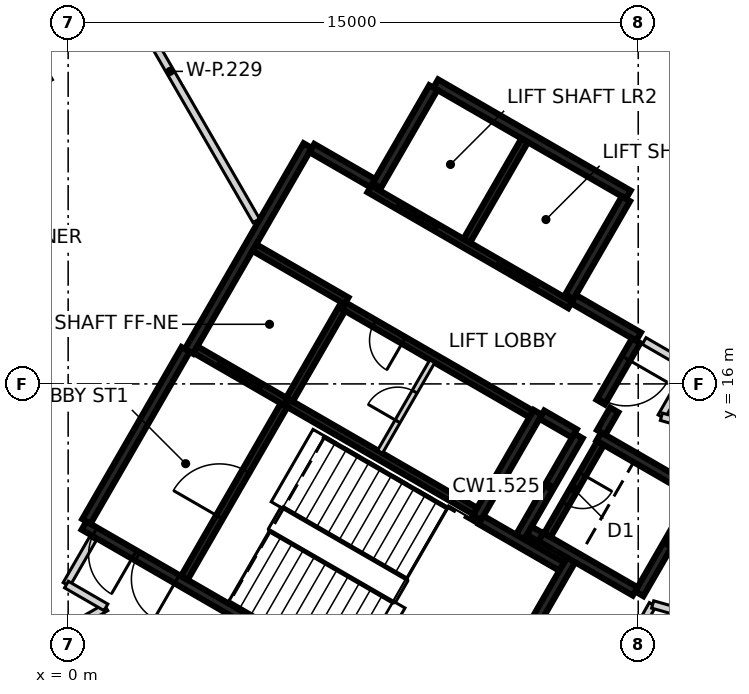
"""IFC4 building model, lengths in metres.
Left out: names, types, materials, properties, quantities, classifications, styles, units other than length and angle.
Written with IfcOpenShell. Run it as: python <this file> out.ifc"""

import sys

from ifc_helpers import new_model, si_unit, direction, frame, frame_2d, origin, place, context, subcontext, project, spatial, rectangle, extrude, element, fill, save


model = new_model("IFC4")
c1 = context("Model", 3, precision=1e-05, world=origin(), true_north=direction((0.0, 1.0)))
c2 = subcontext(c1, "Body", "Model", "MODEL_VIEW")
j1 = project(units=[si_unit("LENGTHUNIT", "METRE"), si_unit("PLANEANGLEUNIT", "RADIAN")], contexts=[c1])
p1 = place(None, origin())
s1 = spatial("IfcSite", under=j1, at=p1, CompositionType="ELEMENT")
p2 = place(p1, origin())
s2 = spatial("IfcBuilding", under=s1, at=p2, CompositionType="ELEMENT")
p3 = place(p2, frame((0.0, 0.0, 63.8)))
s3 = spatial("IfcBuildingStorey", under=s2, at=p3, CompositionType="ELEMENT", Elevation=63.8)
p4 = place(p3, frame((10.42, 6.498, 0.0), z_axis=(0.0, 0.0, 1.0), x_axis=(-0.866021906294, 0.500006057782, 0.0)))
e1 = element("IfcWall", 1, at=p4, inside=s3, PredefinedType="SHEAR", context=c2, shape_type="SweptSolid", body=[
    extrude(rectangle(XDim=11.55, YDim=0.25, at=frame_2d((5.775, 0.0))), origin(), (0.0, 0.0, 1.0), 3.125),
])
p5 = place(p4, frame((10.025, 0.0, 0.0)))
e2 = element("IfcOpeningElement", 2, at=p5, cuts=e1, PredefinedType="OPENING", context=c2, shape_type="SweptSolid", body=[
    extrude(rectangle(XDim=1.2, YDim=2.1, at=frame_2d((0.6, 1.05))), frame((0.0, 0.135, 0.0), z_axis=(0.0, -1.0, 0.0), x_axis=(1.0, 0.0, 0.0)), (0.0, 0.0, 1.0), 0.27),
])
p6 = place(p4, frame((8.725, 0.0, 0.0)))
e3 = element("IfcOpeningElement", 3, at=p6, cuts=e1, PredefinedType="OPENING", context=c2, shape_type="SweptSolid", body=[
    extrude(rectangle(XDim=1.2, YDim=2.1, at=frame_2d((0.6, 1.05))), frame((0.0, 0.135, 0.0), z_axis=(0.0, -1.0, 0.0), x_axis=(1.0, 0.0, 0.0)), (0.0, 0.0, 1.0), 0.27),
])
p7 = place(p3, frame((3.179, 16.856, 0.0), z_axis=(0.0, 0.0, 1.0), x_axis=(0.500004234368, 0.866022959057, 0.0)))
e4 = element("IfcWall", 4, at=p7, inside=s3, PredefinedType="SHEAR", context=c2, shape_type="SweptSolid", body=[
    extrude(rectangle(XDim=6.25, YDim=0.25, at=frame_2d((3.125, 0.0))), origin(), (0.0, 0.0, 1.0), 3.125),
])
p8 = place(p3, frame((9.673, 23.903, 0.0), z_axis=(0.0, 0.0, 1.0), x_axis=(0.86603616409, -0.499981362141, 0.0)))
e5 = element("IfcWall", 5, at=p8, inside=s3, PredefinedType="SHEAR", context=c2, shape_type="SweptSolid", body=[
    extrude(rectangle(XDim=5.85, YDim=0.25, at=frame_2d((2.925, 0.0))), origin(), (0.0, 0.0, 1.0), 3.125),
])
p9 = place(p3, frame((0.48, 12.381, 0.0), z_axis=(0.0, 0.0, 1.0), x_axis=(0.49999885962, 0.866026062182, 0.0)))
e6 = element("IfcWall", 6, at=p9, inside=s3, PredefinedType="SHEAR", context=c2, shape_type="SweptSolid", body=[
    extrude(rectangle(XDim=5.225, YDim=0.25, at=frame_2d((2.612, 0.0))), origin(), (0.0, 0.0, 1.0), 3.125),
])
p10 = place(p3, frame((13.238, 11.378, 0.0), z_axis=(0.0, 0.0, 1.0), x_axis=(-0.500008851346, -0.866020293397, 0.0)))
e7 = element("IfcWall", 7, at=p10, inside=s3, PredefinedType="SHEAR", context=c2, shape_type="SweptSolid", body=[
    extrude(rectangle(XDim=5.51, YDim=0.25, at=frame_2d((2.755, 0.0))), origin(), (0.0, 0.0, 1.0), 3.125),
])
p11 = place(p3, frame((12.357, 15.252, 0.0), z_axis=(0.0, 0.0, 1.0), x_axis=(-0.500028443584, -0.866008981251, 0.0)))
e8 = element("IfcWall", 8, at=p11, inside=s3, PredefinedType="SHEAR", context=c2, shape_type="SweptSolid", body=[
    extrude(rectangle(XDim=3.2, YDim=0.25, at=frame_2d((1.6, 0.0))), origin(), (0.0, 0.0, 1.0), 3.125),
])
for number, where, z_axis, x_axis in (
    (9, (8.123, 21.219, 0.0), (0.0, 0.0, 1.0), (0.5, 0.866, 0.0)),
    (10, (14.676, 20.87, 0.0), (0.0, 0.0, 1.0), (-0.5, -0.866, 0.0)),
):
    element("IfcWall", number, at=place(p3, frame(where, z_axis=z_axis, x_axis=x_axis)), inside=s3, PredefinedType="SHEAR", context=c2, shape_type="SweptSolid", body=[
        extrude(rectangle(XDim=2.975, YDim=0.25, at=frame_2d((1.487, 0.0))), origin(), (0.0, 0.0, 1.0), 3.125),
    ])
p12 = place(p3, frame((16.552, 13.119, 0.0), z_axis=(0.0, 0.0, 1.0), x_axis=(-0.499978833458, -0.866037623948, 0.0)))
e11 = element("IfcWall", 11, at=p12, inside=s3, PredefinedType="SHEAR", context=c2, shape_type="SweptSolid", body=[
    extrude(rectangle(XDim=3.05, YDim=0.25, at=frame_2d((1.525, 0.0))), origin(), (0.0, 0.0, 1.0), 3.125),
])
p13 = place(p3, frame((14.918, 10.54, 0.0), z_axis=(0.0, 0.0, 1.0), x_axis=(-0.866063538972, 0.499933942099, 0.0)))
e12 = element("IfcWall", 12, at=p13, inside=s3, PredefinedType="SHEAR", context=c2, shape_type="SweptSolid", body=[
    extrude(rectangle(XDim=2.865, YDim=0.25, at=frame_2d((1.432, 0.0))), origin(), (0.0, 0.0, 1.0), 3.125),
])
p14 = place(p3, frame((13.963, 14.614, 0.0), z_axis=(0.0, 0.0, 1.0), x_axis=(0.866042235819, -0.499970844928, 0.0)))
e13 = element("IfcWall", 13, at=p14, inside=s3, PredefinedType="SHEAR", context=c2, shape_type="SweptSolid", body=[
    extrude(rectangle(XDim=2.865, YDim=0.25, at=frame_2d((1.432, 0.0))), origin(), (0.0, 0.0, 1.0), 3.125),
])
p15 = place(p3, frame((11.888, 11.961, 0.0), z_axis=(0.0, 0.0, 1.0), x_axis=(0.500003324108, 0.866023484601, 0.0)))
e14 = element("IfcWall", 14, at=p15, inside=s3, PredefinedType="SHEAR", context=c2, shape_type="SweptSolid", body=[
    extrude(rectangle(XDim=3.085, YDim=0.25, at=frame_2d((1.542, 0.0))), origin(), (0.0, 0.0, 1.0), 3.125),
])
p16 = place(p3, frame((10.865, 12.418, 0.0), z_axis=(0.0, 0.0, 1.0), x_axis=(0.866026229868, -0.499998569178, 0.0)))
e15 = element("IfcWall", 15, at=p16, inside=s3, PredefinedType="SHEAR", context=c2, shape_type="SweptSolid", body=[
    extrude(rectangle(XDim=2.449, YDim=0.25, at=frame_2d((1.225, 0.0))), origin(), (0.0, 0.0, 1.0), 3.125),
])
p17 = place(p3, frame((13.297, 18.231, 0.0), z_axis=(0.0, 0.0, 1.0), x_axis=(0.866043531843, -0.499968599967, 0.0)))
e16 = element("IfcWall", 16, at=p17, inside=s3, PredefinedType="SHEAR", context=c2, shape_type="SweptSolid", body=[
    extrude(rectangle(XDim=1.975, YDim=0.25, at=frame_2d((0.987, 0.0))), origin(), (0.0, 0.0, 1.0), 3.125),
])
p18 = place(p3, frame((6.413, 22.206, 0.0), z_axis=(0.0, 0.0, 1.0), x_axis=(0.866016279763, -0.500015802937, 0.0)))
e17 = element("IfcWall", 17, at=p18, inside=s3, PredefinedType="SHEAR", context=c2, shape_type="SweptSolid", body=[
    extrude(rectangle(XDim=1.849, YDim=0.25, at=frame_2d((0.925, 0.0))), origin(), (0.0, 0.0, 1.0), 3.125),
])
p19 = place(p3, frame((14.945, 17.135, 0.0), z_axis=(0.0, 0.0, 1.0), x_axis=(-0.499983108224, -0.866035156036, 0.0)))
e18 = element("IfcWall", 18, at=p19, inside=s3, PredefinedType="SHEAR", context=c2, shape_type="SweptSolid", body=[
    extrude(rectangle(XDim=1.865, YDim=0.25, at=frame_2d((0.932, 0.0))), origin(), (0.0, 0.0, 1.0), 3.125),
])
p20 = place(p19, frame((0.535, 0.0, 0.0)))
e19 = element("IfcOpeningElement", 19, at=p20, cuts=e18, PredefinedType="OPENING", context=c2, shape_type="SweptSolid", body=[
    extrude(rectangle(XDim=1.25, YDim=2.1, at=frame_2d((0.625, 1.05))), frame((0.0, 0.135, 0.0), z_axis=(0.0, -1.0, 0.0), x_axis=(1.0, 0.0, 0.0)), (0.0, 0.0, 1.0), 0.27),
])
p21 = place(p3, frame((13.322, 14.695, 0.0), z_axis=(0.0, 0.0, 1.0), x_axis=(-0.866017078145, 0.500014420154, 0.0)))
e20 = element("IfcWall", 20, at=p21, inside=s3, PredefinedType="SHEAR", context=c2, shape_type="SweptSolid", body=[
    extrude(rectangle(XDim=0.989, YDim=0.25, at=frame_2d((0.495, 0.0))), origin(), (0.0, 0.0, 1.0), 3.125),
])
p22 = place(p3, frame((14.368, 15.315, 0.0), z_axis=(0.0, 0.0, 1.0), x_axis=(-0.499897359611, -0.866084655132, 0.0)))
e21 = element("IfcWall", 21, at=p22, inside=s3, PredefinedType="SHEAR", context=c2, shape_type="SweptSolid", body=[
    extrude(rectangle(XDim=0.685, YDim=0.25, at=frame_2d((0.342, 0.0))), origin(), (0.0, 0.0, 1.0), 3.125),
])
p23 = place(p3, frame((12.433, 11.964, 0.0), z_axis=(0.0, 0.0, 1.0), x_axis=(-0.866055875208, 0.499947218231, 0.0)))
e22 = element("IfcWall", 22, at=p23, inside=s3, PredefinedType="SHEAR", context=c2, shape_type="SweptSolid", body=[
    extrude(rectangle(XDim=0.345, YDim=0.25, at=frame_2d((0.172, 0.0))), origin(), (0.0, 0.0, 1.0), 3.125),
])
p24 = place(p3, frame((13.21, 18.08, 0.0), z_axis=(0.0, 0.0, 1.0), x_axis=(-0.866030299012, 0.499991521122, 0.0)))
e23 = element("IfcWall", 23, at=p24, inside=s3, PredefinedType="SHEAR", context=c2, shape_type="SweptSolid", body=[
    extrude(rectangle(XDim=6.1, YDim=0.2, at=frame_2d((3.05, 0.0))), origin(), (0.0, 0.0, 1.0), 3.125),
])
p25 = place(p24, frame((1.0, 0.0, 0.0)))
e24 = element("IfcOpeningElement", 24, at=p25, cuts=e23, PredefinedType="OPENING", context=c2, shape_type="SweptSolid", body=[
    extrude(rectangle(XDim=1.2, YDim=2.1, at=frame_2d((0.6, 1.05))), frame((0.0, 0.11, 0.0), z_axis=(0.0, -1.0, 0.0), x_axis=(1.0, 0.0, 0.0)), (0.0, 0.0, 1.0), 0.22),
])
p26 = place(p24, frame((4.05, 0.0, 0.0)))
e25 = element("IfcOpeningElement", 25, at=p26, cuts=e23, PredefinedType="OPENING", context=c2, shape_type="SweptSolid", body=[
    extrude(rectangle(XDim=1.2, YDim=2.1, at=frame_2d((0.6, 1.05))), frame((0.0, 0.11, 0.0), z_axis=(0.0, -1.0, 0.0), x_axis=(1.0, 0.0, 0.0)), (0.0, 0.0, 1.0), 0.22),
])
p27 = place(p3, frame((5.775, 15.502, 0.0), z_axis=(0.0, 0.0, 1.0), x_axis=(0.866020080793, -0.500009219579, 0.0)))
e26 = element("IfcWall", 26, at=p27, inside=s3, PredefinedType="SHEAR", context=c2, shape_type="SweptSolid", body=[
    extrude(rectangle(XDim=5.699, YDim=0.2, at=frame_2d((2.85, 0.0))), origin(), (0.0, 0.0, 1.0), 3.125),
])
p28 = place(p3, frame((12.185, 15.207, 0.0), z_axis=(0.0, 0.0, 1.0), x_axis=(-0.866020080793, 0.500009219579, 0.0)))
e27 = element("IfcWall", 27, at=p28, inside=s3, PredefinedType="SHEAR", context=c2, shape_type="SweptSolid", body=[
    extrude(rectangle(XDim=5.699, YDim=0.2, at=frame_2d((2.85, 0.0))), origin(), (0.0, 0.0, 1.0), 3.125),
])
p29 = place(p28, frame((3.874, 0.0, 0.0)))
e28 = element("IfcOpeningElement", 28, at=p29, cuts=e27, PredefinedType="OPENING", context=c2, shape_type="SweptSolid", body=[
    extrude(rectangle(XDim=0.9, YDim=2.1, at=frame_2d((0.45, 1.05))), frame((0.0, 0.11, 0.0), z_axis=(0.0, -1.0, 0.0), x_axis=(1.0, 0.0, 0.0)), (0.0, 0.0, 1.0), 0.22),
])
p30 = place(p3, frame((3.057, 10.895, 0.0), z_axis=(0.0, 0.0, 1.0), x_axis=(0.499989418164, 0.866031513124, 0.0)))
e29 = element("IfcWall", 29, at=p30, inside=s3, PredefinedType="SHEAR", context=c2, shape_type="SweptSolid", body=[
    extrude(rectangle(XDim=5.251, YDim=0.2, at=frame_2d((2.625, 0.0))), origin(), (0.0, 0.0, 1.0), 3.125),
])
p31 = place(p30, frame((1.849, 0.0, 0.0)))
e30 = element("IfcOpeningElement", 30, at=p31, cuts=e29, PredefinedType="OPENING", context=c2, shape_type="SweptSolid", body=[
    extrude(rectangle(XDim=1.4, YDim=2.1, at=frame_2d((0.7, 1.05))), frame((0.0, 0.11, 0.0), z_axis=(0.0, -1.0, 0.0), x_axis=(1.0, 0.0, 0.0)), (0.0, 0.0, 1.0), 0.22),
])
p32 = place(p3, frame((10.489, 19.767, 0.0), z_axis=(0.0, 0.0, 1.0), x_axis=(0.499946628782, 0.866056215479, 0.0)))
e31 = element("IfcWall", 31, at=p32, inside=s3, PredefinedType="SHEAR", context=c2, shape_type="SweptSolid", body=[
    extrude(rectangle(XDim=3.048, YDim=0.2, at=frame_2d((1.524, 0.0))), origin(), (0.0, 0.0, 1.0), 3.125),
])
p33 = place(p3, frame((14.008, 14.442, 0.0), z_axis=(0.0, 0.0, 1.0), x_axis=(-0.499986818241, -0.866033014143, 0.0)))
e32 = element("IfcWall", 32, at=p33, inside=s3, PredefinedType="SHEAR", context=c2, shape_type="SweptSolid", body=[
    extrude(rectangle(XDim=2.798, YDim=0.2, at=frame_2d((1.399, 0.0))), origin(), (0.0, 0.0, 1.0), 3.125),
])
p34 = place(p33, frame((0.949, 0.0, 0.0)))
e33 = element("IfcOpeningElement", 33, at=p34, cuts=e32, PredefinedType="OPENING", context=c2, shape_type="SweptSolid", body=[
    extrude(rectangle(XDim=0.9, YDim=2.1, at=frame_2d((0.45, 1.05))), frame((0.0, 0.11, 0.0), z_axis=(0.0, -1.0, 0.0), x_axis=(1.0, 0.0, 0.0)), (0.0, 0.0, 1.0), 0.22),
])
p35 = place(p3, frame((7.199, 17.97, 0.0), z_axis=(0.0, 0.0, 1.0), x_axis=(-0.499968400327, -0.866043647095, 0.0)))
e34 = element("IfcWall", 34, at=p35, inside=s3, PredefinedType="SHEAR", context=c2, shape_type="SweptSolid", body=[
    extrude(rectangle(XDim=2.75, YDim=0.2, at=frame_2d((1.375, 0.0))), origin(), (0.0, 0.0, 1.0), 3.125),
])
p36 = place(p3, frame((5.725, 15.531, 0.0), z_axis=(0.0, 0.0, 1.0), x_axis=(-0.866037306777, 0.499979382845, 0.0)))
e35 = element("IfcWall", 35, at=p36, inside=s3, PredefinedType="SHEAR", context=c2, shape_type="SweptSolid", body=[
    extrude(rectangle(XDim=2.742, YDim=0.2, at=frame_2d((1.371, 0.0))), origin(), (0.0, 0.0, 1.0), 3.125),
])
p37 = place(p36, frame((0.743, 0.0, 0.0)))
e36 = element("IfcOpeningElement", 36, at=p37, cuts=e35, PredefinedType="OPENING", context=c2, shape_type="SweptSolid", body=[
    extrude(rectangle(XDim=1.3, YDim=2.1, at=frame_2d((0.65, 1.05))), frame((0.0, 0.11, 0.0), z_axis=(0.0, -1.0, 0.0), x_axis=(1.0, 0.0, 0.0)), (0.0, 0.0, 1.0), 0.22),
])
p38 = place(p3, frame((4.901, 19.586, 0.0), z_axis=(0.0, 0.0, 1.0), x_axis=(0.866022890907, -0.500004352405, 0.0)))
e37 = element("IfcWall", 37, at=p38, inside=s3, PredefinedType="SHEAR", context=c2, shape_type="SweptSolid", body=[
    extrude(rectangle(XDim=2.799, YDim=0.2, at=frame_2d((1.399, 0.0))), origin(), (0.0, 0.0, 1.0), 3.125),
])
p39 = place(p3, frame((8.207, 14.214, 0.0), z_axis=(0.0, 0.0, 1.0), x_axis=(0.499922376475, 0.866070215109, 0.0)))
e38 = element("IfcWall", 38, at=p39, inside=s3, PredefinedType="PARTITIONING", context=c2, shape_type="SweptSolid", body=[
    extrude(rectangle(XDim=2.749, YDim=0.15, at=frame_2d((1.374, 0.0))), origin(), (0.0, 0.0, 1.0), 3.125),
])
p40 = place(p39, frame((0.924, 0.0, 0.0)))
e39 = element("IfcOpeningElement", 39, at=p40, cuts=e38, PredefinedType="OPENING", context=c2, shape_type="SweptSolid", body=[
    extrude(rectangle(XDim=0.9, YDim=2.1, at=frame_2d((0.45, 1.05))), frame((0.0, 0.085, 0.0), z_axis=(0.0, -1.0, 0.0), x_axis=(1.0, 0.0, 0.0)), (0.0, 0.0, 1.0), 0.17),
])
p41 = place(p3, frame((-0.045, 9.522, 0.0), z_axis=(0.0, 0.0, 1.0), x_axis=(0.86625675314, 0.499599076899, 0.0)))
e40 = element("IfcWall", 40, at=p41, inside=s3, PredefinedType="PARTITIONING", context=c2, shape_type="SweptSolid", body=[
    extrude(rectangle(XDim=1.199, YDim=0.2, at=frame_2d((0.6, 0.0))), origin(), (0.0, 0.0, 1.0), 3.125),
])
p42 = place(p3, frame((-0.045, 10.722, 0.0), z_axis=(0.0, 0.0, 1.0), x_axis=(0.500107785535, 0.865963164833, 0.0)))
e41 = element("IfcWall", 41, at=p42, inside=s3, PredefinedType="PARTITIONING", context=c2, shape_type="SweptSolid", body=[
    extrude(rectangle(XDim=1.389, YDim=0.2, at=frame_2d((0.695, 0.0))), origin(), (0.0, 0.0, 1.0), 3.125),
])
p43 = place(p3, frame((-0.045, 10.721, 0.0), z_axis=(0.0, 0.0, 1.0), x_axis=(0.865992388649, -0.500057179532, 0.0)))
e42 = element("IfcWall", 42, at=p43, inside=s3, PredefinedType="PARTITIONING", context=c2, shape_type="SweptSolid", body=[
    extrude(rectangle(XDim=1.199, YDim=0.2, at=frame_2d((0.6, 0.0))), origin(), (0.0, 0.0, 1.0), 3.125),
])
p44 = place(p3, frame((12.433, 4.992, 0.0), z_axis=(0.0, 0.0, 1.0), x_axis=(0.492583054982, 0.870265438786, 0.0)))
e43 = element("IfcWall", 43, at=p44, inside=s3, PredefinedType="PARTITIONING", context=c2, shape_type="SweptSolid", body=[
    extrude(rectangle(XDim=5.981, YDim=0.2, at=frame_2d((2.991, 0.0))), origin(), (0.0, 0.0, 1.0), 3.125),
])
p45 = place(p44, frame((3.469, 0.0, 0.0)))
e44 = element("IfcOpeningElement", 44, at=p45, cuts=e43, PredefinedType="OPENING", context=c2, shape_type="SweptSolid", body=[
    extrude(rectangle(XDim=1.0, YDim=2.1, at=frame_2d((0.5, 1.05))), frame((0.0, 0.11, 0.0), z_axis=(0.0, -1.0, 0.0), x_axis=(1.0, 0.0, 0.0)), (0.0, 0.0, 1.0), 0.22),
])
p46 = place(p3, frame((15.156, 17.13, 0.0), z_axis=(0.0, 0.0, 1.0), x_axis=(0.865755062894, -0.500467952093, 0.0)))
e45 = element("IfcWall", 45, at=p46, inside=s3, PredefinedType="PARTITIONING", context=c2, shape_type="SweptSolid", body=[
    extrude(rectangle(XDim=1.389, YDim=0.2, at=frame_2d((0.694, 0.0))), origin(), (0.0, 0.0, 1.0), 3.125),
])
p47 = place(p3, frame((15.38, 10.197, 0.0), z_axis=(0.0, 0.0, 1.0), x_axis=(0.961523947641, -0.274721127897, 0.0)))
e46 = element("IfcWall", 46, at=p47, inside=s3, PredefinedType="PARTITIONING", context=c2, shape_type="SweptSolid", body=[
    extrude(rectangle(XDim=1.001, YDim=0.2, at=frame_2d((0.5, 0.0))), origin(), (0.0, 0.0, 1.0), 3.125),
])
p48 = place(p3, frame((15.609, 15.136, 0.0), z_axis=(0.0, 0.0, 1.0), x_axis=(0.499501622561, 0.866312950993, 0.0)))
e47 = element("IfcWall", 47, at=p48, inside=s3, PredefinedType="PARTITIONING", context=c2, shape_type="SweptSolid", body=[
    extrude(rectangle(XDim=1.5, YDim=0.2, at=frame_2d((0.75, 0.0))), origin(), (0.0, 0.0, 1.0), 3.125),
])
p49 = place(p3, frame((15.609, 15.136, 0.0), z_axis=(0.0, 0.0, 1.0), x_axis=(0.961662011825, -0.274237442763, 0.0)))
e48 = element("IfcWall", 48, at=p49, inside=s3, PredefinedType="PARTITIONING", context=c2, shape_type="SweptSolid", body=[
    extrude(rectangle(XDim=1.2, YDim=0.2, at=frame_2d((0.6, 0.0))), origin(), (0.0, 0.0, 1.0), 3.125),
])
p50 = place(p3, frame((0.412, 28.153, 0.0), z_axis=(0.0, 0.0, 1.0), x_axis=(0.500039143415, -0.866002803143, 0.0)))
e49 = element("IfcWall", 49, at=p50, inside=s3, PredefinedType="PARTITIONING", context=c2, shape_type="SweptSolid", body=[
    extrude(rectangle(XDim=9.075, YDim=0.2, at=frame_2d((4.538, 0.0))), origin(), (0.0, 0.0, 1.0), 2.225),
])
p51 = place(p37, origin())
e50 = element("IfcDoor", 50, at=p51, inside=s3, OperationType="SLIDING_TO_RIGHT", PredefinedType="DOOR", context=c2, shape_type="SweptSolid", body=[
    extrude(rectangle(XDim=1.3, YDim=2.1, at=frame_2d((0.65, 1.05))), frame((0.0, 0.025, 0.0), z_axis=(0.0, -1.0, 0.0), x_axis=(1.0, 0.0, 0.0)), (0.0, 0.0, 1.0), 0.05),
])
fill(e36, e50)
p52 = place(p25, origin())
e51 = element("IfcDoor", 51, at=p52, inside=s3, OperationType="DOUBLE_DOOR_SLIDING", PredefinedType="DOOR", context=c2, shape_type="SweptSolid", body=[
    extrude(rectangle(XDim=1.2, YDim=2.1, at=frame_2d((0.6, 1.05))), frame((0.0, 0.025, 0.0), z_axis=(0.0, -1.0, 0.0), x_axis=(1.0, 0.0, 0.0)), (0.0, 0.0, 1.0), 0.05),
])
fill(e24, e51)
p53 = place(p26, origin())
e52 = element("IfcDoor", 52, at=p53, inside=s3, OperationType="DOUBLE_DOOR_SLIDING", PredefinedType="DOOR", context=c2, shape_type="SweptSolid", body=[
    extrude(rectangle(XDim=1.2, YDim=2.1, at=frame_2d((0.6, 1.05))), frame((0.0, 0.025, 0.0), z_axis=(0.0, -1.0, 0.0), x_axis=(1.0, 0.0, 0.0)), (0.0, 0.0, 1.0), 0.05),
])
fill(e25, e52)
p54 = place(p20, origin())
e53 = element("IfcDoor", 53, at=p54, inside=s3, OperationType="SINGLE_SWING_LEFT", PredefinedType="DOOR", context=c2, shape_type="SweptSolid", body=[
    extrude(rectangle(XDim=1.25, YDim=2.1, at=frame_2d((0.625, 1.05))), frame((0.0, 0.025, 0.0), z_axis=(0.0, -1.0, 0.0), x_axis=(1.0, 0.0, 0.0)), (0.0, 0.0, 1.0), 0.05),
])
fill(e19, e53)
p55 = place(p5, origin())
e54 = element("IfcDoor", 54, at=p55, inside=s3, OperationType="SINGLE_SWING_LEFT", PredefinedType="DOOR", context=c2, shape_type="SweptSolid", body=[
    extrude(rectangle(XDim=1.2, YDim=2.1, at=frame_2d((0.6, 1.05))), frame((0.0, 0.025, 0.0), z_axis=(0.0, -1.0, 0.0), x_axis=(1.0, 0.0, 0.0)), (0.0, 0.0, 1.0), 0.05),
])
fill(e2, e54)
p56 = place(p6, origin())
e55 = element("IfcDoor", 55, at=p56, inside=s3, OperationType="SINGLE_SWING_RIGHT", PredefinedType="DOOR", context=c2, shape_type="SweptSolid", body=[
    extrude(rectangle(XDim=1.2, YDim=2.1, at=frame_2d((0.6, 1.05))), frame((0.0, 0.025, 0.0), z_axis=(0.0, -1.0, 0.0), x_axis=(1.0, 0.0, 0.0)), (0.0, 0.0, 1.0), 0.05),
])
fill(e3, e55)
p57 = place(p31, origin())
e56 = element("IfcDoor", 56, at=p57, inside=s3, OperationType="SINGLE_SWING_RIGHT", PredefinedType="DOOR", context=c2, shape_type="SweptSolid", body=[
    extrude(rectangle(XDim=1.4, YDim=2.1, at=frame_2d((0.7, 1.05))), frame((0.0, 0.025, 0.0), z_axis=(0.0, -1.0, 0.0), x_axis=(1.0, 0.0, 0.0)), (0.0, 0.0, 1.0), 0.05),
])
fill(e30, e56)
p58 = place(p29, origin())
e57 = element("IfcDoor", 57, at=p58, inside=s3, OperationType="SINGLE_SWING_LEFT", PredefinedType="DOOR", context=c2, shape_type="SweptSolid", body=[
    extrude(rectangle(XDim=0.9, YDim=2.1, at=frame_2d((0.45, 1.05))), frame((0.0, 0.025, 0.0), z_axis=(0.0, -1.0, 0.0), x_axis=(1.0, 0.0, 0.0)), (0.0, 0.0, 1.0), 0.05),
])
fill(e28, e57)
p59 = place(p34, origin())
e58 = element("IfcDoor", 58, at=p59, inside=s3, OperationType="SINGLE_SWING_RIGHT", PredefinedType="DOOR", context=c2, shape_type="SweptSolid", body=[
    extrude(rectangle(XDim=0.9, YDim=2.1, at=frame_2d((0.45, 1.05))), frame((0.0, 0.025, 0.0), z_axis=(0.0, -1.0, 0.0), x_axis=(1.0, 0.0, 0.0)), (0.0, 0.0, 1.0), 0.05),
])
fill(e33, e58)
p60 = place(p40, origin())
e59 = element("IfcDoor", 59, at=p60, inside=s3, OperationType="SINGLE_SWING_LEFT", PredefinedType="DOOR", context=c2, shape_type="SweptSolid", body=[
    extrude(rectangle(XDim=0.9, YDim=2.1, at=frame_2d((0.45, 1.05))), frame((0.0, 0.025, 0.0), z_axis=(0.0, -1.0, 0.0), x_axis=(1.0, 0.0, 0.0)), (0.0, 0.0, 1.0), 0.05),
])
fill(e39, e59)
save(model, sys.argv[1])
